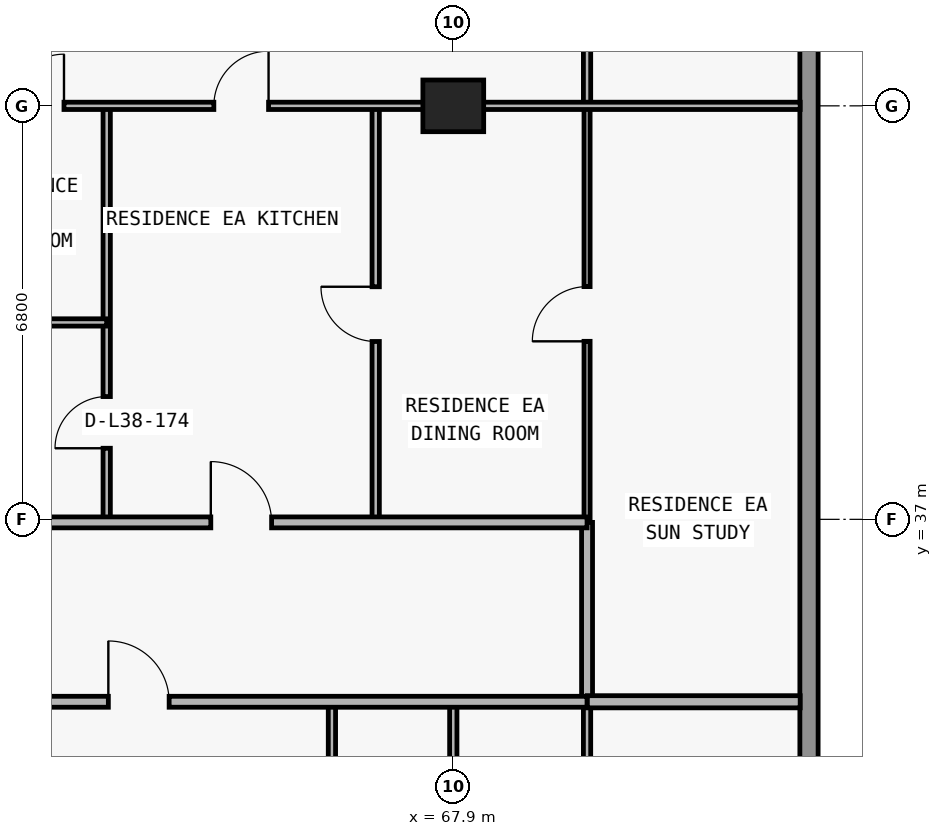
"""IFC4 building model, lengths in metres.
Left out: names, types, materials, properties, quantities, classifications, styles, units other than length and angle.
Written with IfcOpenShell. Run it as: python <this file> out.ifc"""

import sys

from ifc_helpers import new_model, si_unit, direction, frame, frame_2d, origin, origin_2d, place, context, subcontext, project, spatial, rectangle, extrude, element, fill, save


model = new_model("IFC4")
c1 = context("Model", 3, precision=1e-05, world=origin(), true_north=direction((0.0, 1.0)))
c2 = subcontext(c1, "Body", "Model", "MODEL_VIEW")
j1 = project(units=[si_unit("LENGTHUNIT", "METRE"), si_unit("PLANEANGLEUNIT", "RADIAN")], contexts=[c1])
p1 = place(None, origin())
s1 = spatial("IfcSite", under=j1, at=p1, CompositionType="ELEMENT")
p2 = place(p1, origin())
s2 = spatial("IfcBuilding", under=s1, at=p2, CompositionType="ELEMENT")
p3 = place(p2, frame((0.0, 0.0, 138.9)))
s3 = spatial("IfcBuildingStorey", under=s2, at=p3, CompositionType="ELEMENT", Elevation=138.9)
p4 = place(p3, frame((67.9, 43.8, 0.0), z_axis=(0.0, 0.0, 1.0), x_axis=(1.0, 0.0, 0.0)))
e1 = element("IfcColumn", 1, at=p4, inside=s3, PredefinedType="COLUMN", context=c2, shape_type="SweptSolid", body=[
    extrude(rectangle(XDim=1.0, YDim=0.85, at=origin_2d()), origin(), (0.0, 0.0, 1.0), 3.05),
])
p5 = place(p3, frame((73.75, 47.2, 0.0), z_axis=(0.0, 0.0, 1.0), x_axis=(0.0, -1.0, 0.0)))
e2 = element("IfcWall", 2, at=p5, inside=s3, PredefinedType="STANDARD", context=c2, shape_type="SweptSolid", body=[
    extrude(rectangle(XDim=19.2, YDim=0.3, at=frame_2d((9.6, 0.0))), origin(), (0.0, 0.0, 1.0), 3.05),
])
p6 = place(p3, frame((62.2, 36.95, 0.0), z_axis=(0.0, 0.0, 1.0), x_axis=(0.0, 1.0, 0.0)))
e3 = element("IfcWall", 3, at=p6, inside=s3, PredefinedType="PARTITIONING", context=c2, shape_type="SweptSolid", body=[
    extrude(rectangle(XDim=6.85, YDim=0.12, at=frame_2d((3.425, 0.0))), origin(), (0.0, 0.0, 1.0), 3.05),
])
p7 = place(p6, frame((1.219, 0.0, 0.0)))
e4 = element("IfcOpeningElement", 4, at=p7, cuts=e3, PredefinedType="OPENING", context=c2, shape_type="SweptSolid", body=[
    extrude(rectangle(XDim=0.85, YDim=2.1, at=frame_2d((0.425, 1.05))), frame((0.0, 0.07, 0.0), z_axis=(0.0, -1.0, 0.0), x_axis=(1.0, 0.0, 0.0)), (0.0, 0.0, 1.0), 0.14),
])
p8 = place(p3, frame((65.904, 28.84, 0.0), z_axis=(0.0, 0.0, 1.0), x_axis=(0.0, 1.0, 0.0)))
e5 = element("IfcWall", 5, at=p8, inside=s3, PredefinedType="PARTITIONING", context=c2, shape_type="SweptSolid", body=[
    extrude(rectangle(XDim=5.16, YDim=0.12, at=frame_2d((2.58, 0.0))), origin(), (0.0, 0.0, 1.0), 3.05),
])
p9 = place(p8, frame((2.155, 0.0, 0.0)))
e6 = element("IfcOpeningElement", 6, at=p9, cuts=e5, PredefinedType="OPENING", context=c2, shape_type="SweptSolid", body=[
    extrude(rectangle(XDim=0.85, YDim=2.1, at=frame_2d((0.425, 1.05))), frame((0.0, 0.07, 0.0), z_axis=(0.0, -1.0, 0.0), x_axis=(1.0, 0.0, 0.0)), (0.0, 0.0, 1.0), 0.14),
])
p10 = place(p3, frame((66.624, 36.95, 0.0), z_axis=(0.0, 0.0, 1.0), x_axis=(0.0, 1.0, 0.0)))
e7 = element("IfcWall", 7, at=p10, inside=s3, PredefinedType="PARTITIONING", context=c2, shape_type="SweptSolid", body=[
    extrude(rectangle(XDim=6.85, YDim=0.12, at=frame_2d((3.425, 0.0))), origin(), (0.0, 0.0, 1.0), 3.05),
])
p11 = place(p10, frame((2.975, 0.0, 0.0)))
e8 = element("IfcOpeningElement", 8, at=p11, cuts=e7, PredefinedType="OPENING", context=c2, shape_type="SweptSolid", body=[
    extrude(rectangle(XDim=0.9, YDim=2.15, at=frame_2d((0.45, 1.075))), frame((0.0, 0.07, 0.0), z_axis=(0.0, -1.0, 0.0), x_axis=(1.0, 0.0, 0.0)), (0.0, 0.0, 1.0), 0.14),
])
p12 = place(p3, frame((67.9, 28.84, 0.0), z_axis=(0.0, 0.0, 1.0), x_axis=(0.0, 1.0, 0.0)))
e9 = element("IfcWall", 9, at=p12, inside=s3, PredefinedType="PARTITIONING", context=c2, shape_type="SweptSolid", body=[
    extrude(rectangle(XDim=5.16, YDim=0.12, at=frame_2d((2.58, 0.0))), origin(), (0.0, 0.0, 1.0), 2.174),
])
p13 = place(p3, frame((70.1, 28.84, 0.0), z_axis=(0.0, 0.0, 1.0), x_axis=(0.0, 1.0, 0.0)))
e10 = element("IfcWall", 10, at=p13, inside=s3, PredefinedType="PARTITIONING", context=c2, shape_type="SweptSolid", body=[
    extrude(rectangle(XDim=5.16, YDim=0.12, at=frame_2d((2.58, 0.0))), origin(), (0.0, 0.0, 1.0), 3.05),
])
p14 = place(p3, frame((70.1, 34.005, 0.0), z_axis=(0.0, 0.0, 1.0), x_axis=(0.0, 1.0, 0.0)))
e11 = element("IfcWall", 11, at=p14, inside=s3, PredefinedType="PARTITIONING", context=c2, shape_type="SweptSolid", body=[
    extrude(rectangle(XDim=2.945, YDim=0.18, at=frame_2d((1.473, 0.0))), origin(), (0.0, 0.0, 1.0), 3.05),
])
p15 = place(p3, frame((70.1, 36.955, 0.0), z_axis=(0.0, 0.0, 1.0), x_axis=(0.0, 1.0, 0.0)))
e12 = element("IfcWall", 12, at=p15, inside=s3, PredefinedType="MOVABLE", context=c2, shape_type="SweptSolid", body=[
    extrude(rectangle(XDim=6.845, YDim=0.1, at=frame_2d((3.422, 0.0))), origin(), (0.0, 0.0, 1.0), 3.05),
])
p16 = place(p15, frame((2.972, 0.0, 0.0)))
e13 = element("IfcOpeningElement", 13, at=p16, cuts=e12, PredefinedType="OPENING", context=c2, shape_type="SweptSolid", body=[
    extrude(rectangle(XDim=0.9, YDim=2.15, at=frame_2d((0.45, 1.075))), frame((0.0, 0.06, 0.0), z_axis=(0.0, -1.0, 0.0), x_axis=(1.0, 0.0, 0.0)), (0.0, 0.0, 1.0), 0.12),
])
p17 = place(p3, frame((70.1, 43.805, 0.0), z_axis=(0.0, 0.0, 1.0), x_axis=(0.0, 1.0, 0.0)))
e14 = element("IfcWall", 14, at=p17, inside=s3, PredefinedType="PARTITIONING", context=c2, shape_type="SweptSolid", body=[
    extrude(rectangle(XDim=3.275, YDim=0.12, at=frame_2d((1.638, 0.0))), origin(), (0.0, 0.0, 1.0), 3.05),
])
p18 = place(p17, frame((1.188, 0.0, 0.0)))
e15 = element("IfcOpeningElement", 15, at=p18, cuts=e14, PredefinedType="OPENING", context=c2, shape_type="SweptSolid", body=[
    extrude(rectangle(XDim=0.9, YDim=2.15, at=frame_2d((0.45, 1.075))), frame((0.0, 0.07, 0.0), z_axis=(0.0, -1.0, 0.0), x_axis=(1.0, 0.0, 0.0)), (0.0, 0.0, 1.0), 0.14),
])
p19 = place(p3, frame((59.55, 34.0, 0.0), z_axis=(0.0, 0.0, 1.0), x_axis=(1.0, 0.0, 0.0)))
e16 = element("IfcWall", 16, at=p19, inside=s3, PredefinedType="PARTITIONING", context=c2, shape_type="SweptSolid", body=[
    extrude(rectangle(XDim=10.55, YDim=0.18, at=frame_2d((5.275, 0.0))), origin(), (0.0, 0.0, 1.0), 3.05),
])
p20 = place(p19, frame((2.677, 0.0, 0.0)))
e17 = element("IfcOpeningElement", 17, at=p20, cuts=e16, PredefinedType="OPENING", context=c2, shape_type="SweptSolid", body=[
    extrude(rectangle(XDim=1.0, YDim=2.2, at=frame_2d((0.5, 1.1))), frame((0.0, 0.1, 0.0), z_axis=(0.0, -1.0, 0.0), x_axis=(1.0, 0.0, 0.0)), (0.0, 0.0, 1.0), 0.2),
])
p21 = place(p3, frame((70.105, 34.0, 0.0), z_axis=(0.0, 0.0, 1.0), x_axis=(1.0, 0.0, 0.0)))
e18 = element("IfcWall", 18, at=p21, inside=s3, PredefinedType="PARTITIONING", context=c2, shape_type="SweptSolid", body=[
    extrude(rectangle(XDim=3.5, YDim=0.2, at=frame_2d((1.75, 0.0))), origin(), (0.0, 0.0, 1.0), 3.05),
])
p22 = place(p3, frame((59.955, 36.95, 0.0), z_axis=(0.0, 0.0, 1.0), x_axis=(1.0, 0.0, 0.0)))
e19 = element("IfcWall", 19, at=p22, inside=s3, PredefinedType="PARTITIONING", context=c2, shape_type="SweptSolid", body=[
    extrude(rectangle(XDim=10.145, YDim=0.18, at=frame_2d((5.073, 0.0))), origin(), (0.0, 0.0, 1.0), 3.05),
])
p23 = place(p22, frame((3.957, 0.0, 0.0)))
e20 = element("IfcOpeningElement", 20, at=p23, cuts=e19, PredefinedType="OPENING", context=c2, shape_type="SweptSolid", body=[
    extrude(rectangle(XDim=1.0, YDim=2.2, at=frame_2d((0.5, 1.1))), frame((0.0, 0.1, 0.0), z_axis=(0.0, -1.0, 0.0), x_axis=(1.0, 0.0, 0.0)), (0.0, 0.0, 1.0), 0.2),
])
p24 = place(p3, frame((59.945, 40.238, 0.0), z_axis=(0.0, 0.0, 1.0), x_axis=(1.0, 0.0, 0.0)))
e21 = element("IfcWall", 21, at=p24, inside=s3, PredefinedType="PARTITIONING", context=c2, shape_type="SweptSolid", body=[
    extrude(rectangle(XDim=2.255, YDim=0.12, at=frame_2d((1.127, 0.0))), origin(), (0.0, 0.0, 1.0), 3.05),
])
p25 = place(p3, frame((59.945, 43.8, 0.0), z_axis=(0.0, 0.0, 1.0), x_axis=(1.0, 0.0, 0.0)))
e22 = element("IfcWall", 22, at=p25, inside=s3, PredefinedType="PARTITIONING", context=c2, shape_type="SweptSolid", body=[
    extrude(rectangle(XDim=13.66, YDim=0.12, at=frame_2d((6.83, 0.0))), origin(), (0.0, 0.0, 1.0), 2.339),
])
p26 = place(p25, frame((4.017, 0.0, 0.0)))
e23 = element("IfcOpeningElement", 23, at=p26, cuts=e22, PredefinedType="OPENING", context=c2, shape_type="SweptSolid", body=[
    extrude(rectangle(XDim=0.9, YDim=2.15, at=frame_2d((0.45, 1.075))), frame((0.0, 0.07, 0.0), z_axis=(0.0, -1.0, 0.0), x_axis=(1.0, 0.0, 0.0)), (0.0, 0.0, 1.0), 0.14),
])
p27 = place(p25, frame((0.702, 0.0, 0.0)))
e24 = element("IfcOpeningElement", 24, at=p27, cuts=e22, PredefinedType="OPENING", context=c2, shape_type="SweptSolid", body=[
    extrude(rectangle(XDim=0.85, YDim=2.1, at=frame_2d((0.425, 1.05))), frame((0.0, 0.07, 0.0), z_axis=(0.0, -1.0, 0.0), x_axis=(1.0, 0.0, 0.0)), (0.0, 0.0, 1.0), 0.14),
])
p28 = place(p20, origin())
e25 = element("IfcDoor", 25, at=p28, inside=s3, OperationType="SINGLE_SWING_LEFT", PredefinedType="DOOR", context=c2, shape_type="SweptSolid", body=[
    extrude(rectangle(XDim=1.0, YDim=2.2, at=frame_2d((0.5, 1.1))), frame((0.0, 0.025, 0.0), z_axis=(0.0, -1.0, 0.0), x_axis=(1.0, 0.0, 0.0)), (0.0, 0.0, 1.0), 0.05),
])
fill(e17, e25)
p29 = place(p11, origin())
e26 = element("IfcDoor", 26, at=p29, inside=s3, OperationType="SINGLE_SWING_RIGHT", PredefinedType="DOOR", context=c2, shape_type="SweptSolid", body=[
    extrude(rectangle(XDim=0.9, YDim=2.15, at=frame_2d((0.45, 1.075))), frame((0.0, 0.025, 0.0), z_axis=(0.0, -1.0, 0.0), x_axis=(1.0, 0.0, 0.0)), (0.0, 0.0, 1.0), 0.05),
])
fill(e8, e26)
p30 = place(p23, origin())
e27 = element("IfcDoor", 27, at=p30, inside=s3, OperationType="SINGLE_SWING_LEFT", PredefinedType="DOOR", context=c2, shape_type="SweptSolid", body=[
    extrude(rectangle(XDim=1.0, YDim=2.2, at=frame_2d((0.5, 1.1))), frame((0.0, 0.025, 0.0), z_axis=(0.0, -1.0, 0.0), x_axis=(1.0, 0.0, 0.0)), (0.0, 0.0, 1.0), 0.05),
])
fill(e20, e27)
p31 = place(p26, origin())
e28 = element("IfcDoor", 28, at=p31, inside=s3, OperationType="SINGLE_SWING_RIGHT", PredefinedType="DOOR", context=c2, shape_type="SweptSolid", body=[
    extrude(rectangle(XDim=0.9, YDim=2.15, at=frame_2d((0.45, 1.075))), frame((0.0, 0.025, 0.0), z_axis=(0.0, -1.0, 0.0), x_axis=(1.0, 0.0, 0.0)), (0.0, 0.0, 1.0), 0.05),
])
fill(e23, e28)
p32 = place(p7, origin())
e29 = element("IfcDoor", 29, at=p32, inside=s3, OperationType="SINGLE_SWING_LEFT", PredefinedType="DOOR", context=c2, shape_type="SweptSolid", body=[
    extrude(rectangle(XDim=0.85, YDim=2.1, at=frame_2d((0.425, 1.05))), frame((0.0, 0.025, 0.0), z_axis=(0.0, -1.0, 0.0), x_axis=(1.0, 0.0, 0.0)), (0.0, 0.0, 1.0), 0.05),
])
fill(e4, e29)
p33 = place(p27, origin())
e30 = element("IfcDoor", 30, at=p33, inside=s3, OperationType="SINGLE_SWING_RIGHT", PredefinedType="DOOR", context=c2, shape_type="SweptSolid", body=[
    extrude(rectangle(XDim=0.85, YDim=2.1, at=frame_2d((0.425, 1.05))), frame((0.0, 0.025, 0.0), z_axis=(0.0, -1.0, 0.0), x_axis=(1.0, 0.0, 0.0)), (0.0, 0.0, 1.0), 0.05),
])
fill(e24, e30)
p34 = place(p16, origin())
e31 = element("IfcDoor", 31, at=p34, inside=s3, OperationType="SINGLE_SWING_LEFT", PredefinedType="DOOR", context=c2, shape_type="SweptSolid", body=[
    extrude(rectangle(XDim=0.9, YDim=2.15, at=frame_2d((0.45, 1.075))), frame((0.0, 0.025, 0.0), z_axis=(0.0, -1.0, 0.0), x_axis=(1.0, 0.0, 0.0)), (0.0, 0.0, 1.0), 0.05),
])
fill(e13, e31)
save(model, sys.argv[1])
